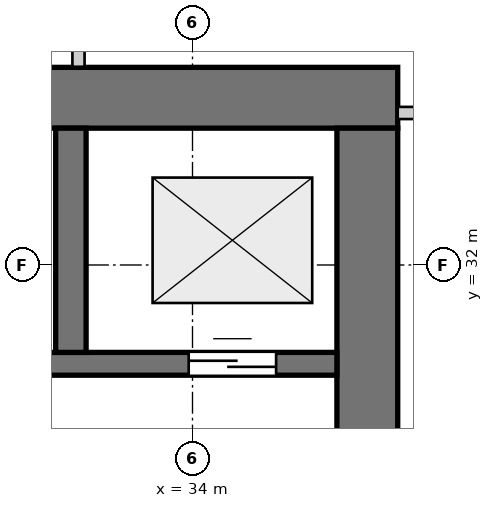
"""IFC4 building model, lengths in metres.
Left out: names, types, materials, properties, quantities, classifications, styles, units other than length and angle.
Written with IfcOpenShell. Run it as: python <this file> out.ifc"""

import sys

from ifc_helpers import new_model, si_unit, direction, frame, frame_2d, origin, place, context, subcontext, project, spatial, rectangle, extrude, source, transform, mapped, element, fill, save


model = new_model("IFC4")
c1 = context("Model", 3, precision=1e-05, world=origin(), true_north=direction((0.0, 1.0)))
c2 = subcontext(c1, "Body", "Model", "MODEL_VIEW")
j1 = project(units=[si_unit("LENGTHUNIT", "METRE"), si_unit("PLANEANGLEUNIT", "RADIAN")], contexts=[c1])
p1 = place(None, origin())
s1 = spatial("IfcSite", under=j1, at=p1, CompositionType="ELEMENT")
p2 = place(p1, origin())
s2 = spatial("IfcBuilding", under=s1, at=p2, CompositionType="ELEMENT")
p3 = place(p2, frame((0.0, 0.0, -8.7)))
s3 = spatial("IfcBuildingStorey", under=s2, at=p3, CompositionType="ELEMENT", Elevation=-8.7)
p4 = place(p3, frame((36.7, 34.2, 0.0), z_axis=(0.0, 0.0, 1.0), x_axis=(-1.0, 0.0, 0.0)))
e1 = element("IfcWall", 1, at=p4, inside=s3, PredefinedType="SHEAR", context=c2, shape_type="SweptSolid", body=[
    extrude(rectangle(XDim=12.7, YDim=0.8, at=frame_2d((6.35, 0.0))), origin(), (0.0, 0.0, 1.0), 4.2),
])
p5 = place(p3, frame((36.3, 18.2, 0.0), z_axis=(0.0, 0.0, 1.0), x_axis=(0.0, 1.0, 0.0)))
e2 = element("IfcWall", 2, at=p5, inside=s3, PredefinedType="SHEAR", context=c2, shape_type="SweptSolid", body=[
    extrude(rectangle(XDim=15.6, YDim=0.8, at=frame_2d((7.8, 0.0))), origin(), (0.0, 0.0, 1.0), 4.2),
])
p6 = place(p5, frame((4.25, 0.0, 0.0)))
e3 = element("IfcOpeningElement", 3, at=p6, cuts=e2, PredefinedType="OPENING", context=c2, shape_type="SweptSolid", body=[
    extrude(rectangle(XDim=1.1, YDim=2.15, at=frame_2d((0.55, 1.075))), frame((0.0, 0.41, 0.0), z_axis=(0.0, -1.0, 0.0), x_axis=(1.0, 0.0, 0.0)), (0.0, 0.0, 1.0), 0.82),
])
p7 = place(p5, frame((10.25, 0.0, 0.0)))
e4 = element("IfcOpeningElement", 4, at=p7, cuts=e2, PredefinedType="OPENING", context=c2, shape_type="SweptSolid", body=[
    extrude(rectangle(XDim=1.1, YDim=2.15, at=frame_2d((0.55, 1.075))), frame((0.0, 0.41, 0.0), z_axis=(0.0, -1.0, 0.0), x_axis=(1.0, 0.0, 0.0)), (0.0, 0.0, 1.0), 0.82),
])
p8 = place(p3, frame((24.8, 30.7, 0.0), z_axis=(0.0, 0.0, 1.0), x_axis=(1.0, 0.0, 0.0)))
e5 = element("IfcWall", 5, at=p8, inside=s3, PredefinedType="SHEAR", context=c2, shape_type="SweptSolid", body=[
    extrude(rectangle(XDim=11.1, YDim=0.3, at=frame_2d((5.55, 0.0))), origin(), (0.0, 0.0, 1.0), 4.2),
])
p9 = place(p8, frame((6.22, 0.0, 0.0)))
e6 = element("IfcOpeningElement", 6, at=p9, cuts=e5, PredefinedType="OPENING", context=c2, shape_type="SweptSolid", body=[
    extrude(rectangle(XDim=0.98, YDim=2.15, at=frame_2d((0.49, 1.075))), frame((0.0, 0.16, 0.0), z_axis=(0.0, -1.0, 0.0), x_axis=(1.0, 0.0, 0.0)), (0.0, 0.0, 1.0), 0.32),
])
p10 = place(p8, frame((9.15, 0.0, 0.0)))
e7 = element("IfcOpeningElement", 7, at=p10, cuts=e5, PredefinedType="OPENING", context=c2, shape_type="SweptSolid", body=[
    extrude(rectangle(XDim=1.15, YDim=2.15, at=frame_2d((0.575, 1.075))), frame((0.0, 0.16, 0.0), z_axis=(0.0, -1.0, 0.0), x_axis=(1.0, 0.0, 0.0)), (0.0, 0.0, 1.0), 0.32),
])
p11 = place(p3, frame((32.4, 30.85, 0.0), z_axis=(0.0, 0.0, 1.0), x_axis=(0.0, 1.0, 0.0)))
e8 = element("IfcWall", 8, at=p11, inside=s3, PredefinedType="SHEAR", context=c2, shape_type="SweptSolid", body=[
    extrude(rectangle(XDim=2.95, YDim=0.4, at=frame_2d((1.475, 0.0))), origin(), (0.0, 0.0, 1.0), 4.2),
])
p12 = place(p3, frame((32.5, 34.608, 0.0), z_axis=(0.0, 0.0, 1.0), x_axis=(0.0, 1.0, 0.0)))
e9 = element("IfcWall", 9, at=p12, inside=s3, PredefinedType="PARTITIONING", context=c2, shape_type="SweptSolid", body=[
    extrude(rectangle(XDim=1.804, YDim=0.16, at=frame_2d((0.902, 0.0))), origin(), (0.0, 0.0, 1.0), 4.2),
])
p13 = place(p3, frame((36.7, 34.0, 0.0), z_axis=(0.0, 0.0, 1.0), x_axis=(1.0, 0.0, 0.0)))
e10 = element("IfcWall", 10, at=p13, inside=s3, PredefinedType="PARTITIONING", context=c2, shape_type="SweptSolid", body=[
    extrude(rectangle(XDim=2.5, YDim=0.16, at=frame_2d((1.25, 0.0))), origin(), (0.0, 0.0, 1.0), 4.2),
])
p14 = place(p13, frame((0.65, 0.0, 0.0)))
e11 = element("IfcOpeningElement", 11, at=p14, cuts=e10, PredefinedType="OPENING", context=c2, shape_type="SweptSolid", body=[
    extrude(rectangle(XDim=1.1, YDim=2.15, at=frame_2d((0.55, 1.075))), frame((0.0, 0.09, 0.0), z_axis=(0.0, -1.0, 0.0), x_axis=(1.0, 0.0, 0.0)), (0.0, 0.0, 1.0), 0.18),
])
m1 = source(origin(), c2, "Body", "SweptSolid", [
    extrude(rectangle(XDim=1.15, YDim=2.15, at=frame_2d((0.575, 1.075))), frame((0.0, 0.025, 0.0), z_axis=(0.0, -1.0, 0.0), x_axis=(1.0, 0.0, 0.0)), (0.0, 0.0, 1.0), 0.05),
])
p15 = place(p10, origin())
e12 = element("IfcDoor", 12, at=p15, inside=s3, OperationType="DOUBLE_DOOR_SLIDING", PredefinedType="DOOR", context=c2, shape_type="MappedRepresentation", body=[
    mapped(m1, transform((0.0, 0.0, 0.0), x_axis=(1.0, 0.0, 0.0), y_axis=(0.0, 1.0, 0.0), z_axis=(0.0, 0.0, 1.0), scale=1.0)),
])
fill(e7, e12)
save(model, sys.argv[1])
